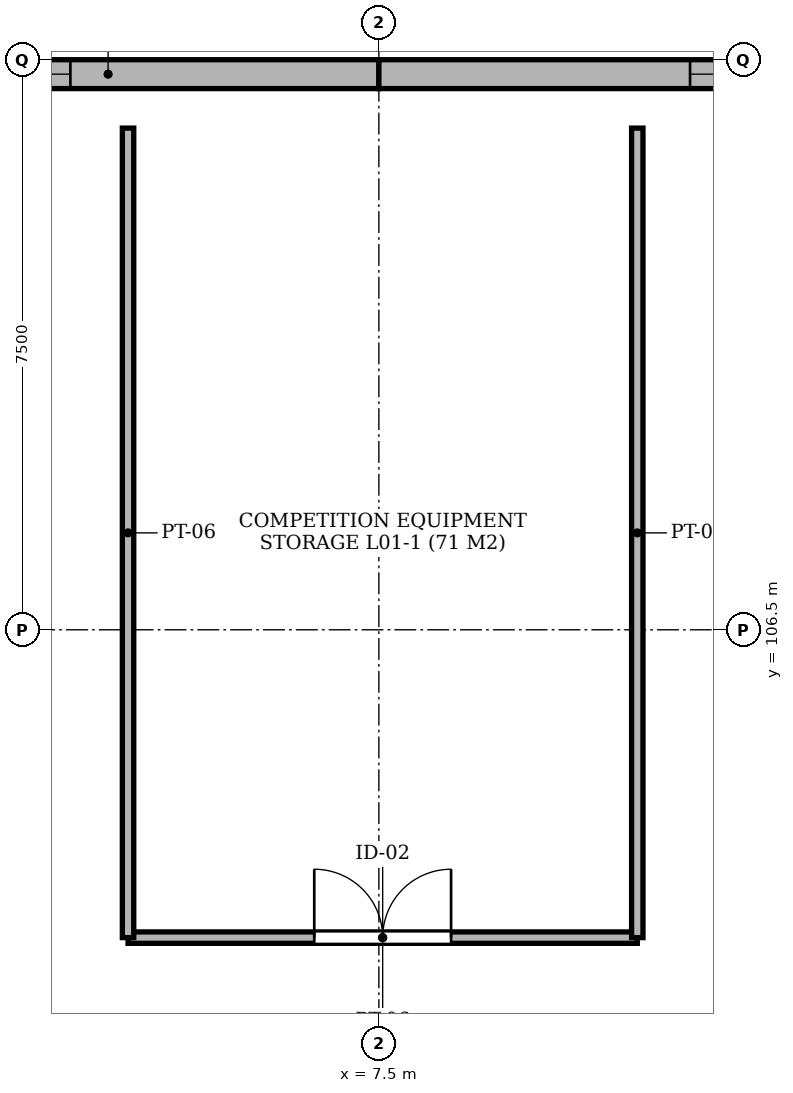
"""IFC4 building model, lengths in metres.
Left out: names, types, materials, properties, quantities, classifications, styles, units other than length and angle.
Written with IfcOpenShell. Run it as: python <this file> out.ifc"""

import sys

from ifc_helpers import new_model, si_unit, direction, frame, frame_2d, origin, place, context, subcontext, project, spatial, rectangle, extrude, element, fill, save


model = new_model("IFC4")
c1 = context("Model", 3, precision=1e-05, world=origin(), true_north=direction((0.0, 1.0)))
c2 = subcontext(c1, "Body", "Model", "MODEL_VIEW")
j1 = project(units=[si_unit("LENGTHUNIT", "METRE"), si_unit("PLANEANGLEUNIT", "RADIAN")], contexts=[c1])
p1 = place(None, origin())
s1 = spatial("IfcSite", under=j1, at=p1, CompositionType="ELEMENT")
p2 = place(p1, origin())
s2 = spatial("IfcBuilding", under=s1, at=p2, CompositionType="ELEMENT")
p3 = place(p2, frame((0.0, 0.0, 4.6)))
s3 = spatial("IfcBuildingStorey", under=s2, at=p3, CompositionType="ELEMENT", Elevation=4.6)
p4 = place(p3, frame((7.5, 113.81, 0.0), z_axis=(0.0, 0.0, 1.0), x_axis=(-1.0, 0.0, 0.0)))
e1 = element("IfcWall", 1, at=p4, inside=s3, PredefinedType="SOLIDWALL", context=c2, shape_type="SweptSolid", body=[
    extrude(rectangle(XDim=7.125, YDim=0.38, at=frame_2d((3.562, 0.0))), origin(), (0.0, 0.0, 1.0), 3.65),
])
p5 = place(p4, frame((4.059, 0.0, 0.92)))
e2 = element("IfcOpeningElement", 2, at=p5, cuts=e1, PredefinedType="OPENING", context=c2, shape_type="SweptSolid", body=[
    extrude(rectangle(XDim=2.0, YDim=2.3, at=frame_2d((1.0, 1.15))), frame((0.0, 0.202, 0.0), z_axis=(0.0, -1.0, 0.0), x_axis=(1.0, 0.0, 0.0)), (0.0, 0.0, 1.0), 0.404),
])
p6 = place(p3, frame((14.675, 113.81, 0.0), z_axis=(0.0, 0.0, 1.0), x_axis=(-1.0, 0.0, 0.0)))
e3 = element("IfcWall", 3, at=p6, inside=s3, PredefinedType="SOLIDWALL", context=c2, shape_type="SweptSolid", body=[
    extrude(rectangle(XDim=7.175, YDim=0.38, at=frame_2d((3.587, 0.0))), origin(), (0.0, 0.0, 1.0), 3.65),
])
p7 = place(p6, frame((1.081, 0.0, 0.92)))
e4 = element("IfcOpeningElement", 4, at=p7, cuts=e3, PredefinedType="OPENING", context=c2, shape_type="SweptSolid", body=[
    extrude(rectangle(XDim=2.0, YDim=2.3, at=frame_2d((1.0, 1.15))), frame((0.0, 0.202, 0.0), z_axis=(0.0, -1.0, 0.0), x_axis=(1.0, 0.0, 0.0)), (0.0, 0.0, 1.0), 0.404),
])
p8 = place(p3, frame((4.2, 102.45, 0.0), z_axis=(0.0, 0.0, 1.0), x_axis=(1.0, 0.0, 0.0)))
e5 = element("IfcWall", 5, at=p8, inside=s3, PredefinedType="PARTITIONING", context=c2, shape_type="SweptSolid", body=[
    extrude(rectangle(XDim=6.7, YDim=0.15, at=frame_2d((3.35, 0.0))), origin(), (0.0, 0.0, 1.0), 4.08),
])
p9 = place(p8, frame((2.45, 0.0, 0.0)))
e6 = element("IfcOpeningElement", 6, at=p9, cuts=e5, PredefinedType="OPENING", context=c2, shape_type="SweptSolid", body=[
    extrude(rectangle(XDim=1.8, YDim=2.25, at=frame_2d((0.9, 1.125))), frame((0.0, 0.087, 0.0), z_axis=(0.0, -1.0, 0.0), x_axis=(1.0, 0.0, 0.0)), (0.0, 0.0, 1.0), 0.174),
])
for number, where, z_axis, x_axis in (
    (7, (4.2, 102.45, 0.0), (0.0, 0.0, 1.0), (0.0, 1.0, 0.0)),
    (8, (10.9, 102.45, 0.0), (0.0, 0.0, 1.0), (0.0, 1.0, 0.0)),
):
    element("IfcWall", number, at=place(p3, frame(where, z_axis=z_axis, x_axis=x_axis)), inside=s3, PredefinedType="PARTITIONING", context=c2, shape_type="SweptSolid", body=[
        extrude(rectangle(XDim=10.65, YDim=0.15, at=frame_2d((5.325, 0.0))), origin(), (0.0, 0.0, 1.0), 4.08),
    ])
p10 = place(p5, origin())
e9 = element("IfcWindow", 9, at=p10, inside=s3, PartitioningType="SINGLE_PANEL", PredefinedType="WINDOW", context=c2, shape_type="SweptSolid", body=[
    extrude(rectangle(XDim=2.0, YDim=2.3, at=frame_2d((1.0, 1.15))), frame((0.0, 0.03, 0.0), z_axis=(0.0, -1.0, 0.0), x_axis=(1.0, 0.0, 0.0)), (0.0, 0.0, 1.0), 0.06),
])
fill(e2, e9)
p11 = place(p7, origin())
e10 = element("IfcWindow", 10, at=p11, inside=s3, PartitioningType="SINGLE_PANEL", PredefinedType="WINDOW", context=c2, shape_type="SweptSolid", body=[
    extrude(rectangle(XDim=2.0, YDim=2.3, at=frame_2d((1.0, 1.15))), frame((0.0, 0.03, 0.0), z_axis=(0.0, -1.0, 0.0), x_axis=(1.0, 0.0, 0.0)), (0.0, 0.0, 1.0), 0.06),
])
fill(e4, e10)
p12 = place(p9, origin())
e11 = element("IfcDoor", 11, at=p12, inside=s3, OperationType="DOUBLE_DOOR_SINGLE_SWING", PredefinedType="DOOR", context=c2, shape_type="SweptSolid", body=[
    extrude(rectangle(XDim=1.8, YDim=2.25, at=frame_2d((0.9, 1.125))), frame((0.0, 0.025, 0.0), z_axis=(0.0, -1.0, 0.0), x_axis=(1.0, 0.0, 0.0)), (0.0, 0.0, 1.0), 0.05),
])
fill(e6, e11)
save(model, sys.argv[1])
